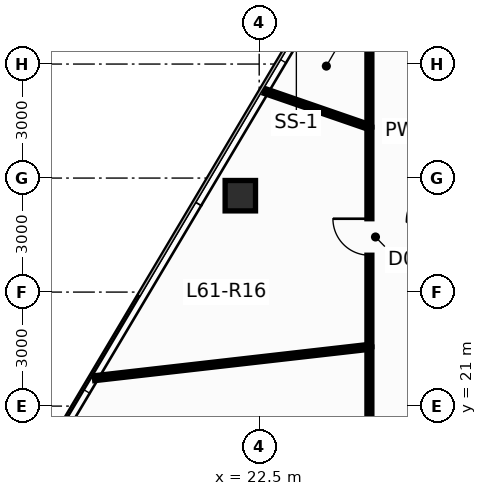
"""IFC4 building model, lengths in metres.
Left out: names, types, materials, properties, quantities, classifications, styles, units other than length and angle.
Written with IfcOpenShell. Run it as: python <this file> out.ifc"""

import sys

from ifc_helpers import new_model, si_unit, direction, frame, frame_2d, origin, origin_2d, place, context, subcontext, project, spatial, rectangle, hollow_rectangle, extrude, source, transform, mapped, element, fill, save


model = new_model("IFC4")
c1 = context("Model", 3, precision=1e-05, world=origin(), true_north=direction((0.0, 1.0)))
c2 = subcontext(c1, "Body", "Model", "MODEL_VIEW")
j1 = project(units=[si_unit("LENGTHUNIT", "METRE"), si_unit("PLANEANGLEUNIT", "RADIAN")], contexts=[c1])
p1 = place(None, origin())
s1 = spatial("IfcSite", under=j1, at=p1, CompositionType="ELEMENT")
p2 = place(p1, origin())
s2 = spatial("IfcBuilding", under=s1, at=p2, CompositionType="ELEMENT")
p3 = place(p2, frame((0.0, 0.0, 233.5)))
s3 = spatial("IfcBuildingStorey", under=s2, at=p3, CompositionType="ELEMENT", Elevation=233.5)
m1 = source(origin(), c2, "Body", "SweptSolid", [
    extrude(hollow_rectangle(XDim=0.8, YDim=0.8, WallThickness=0.045, at=origin_2d()), origin(), (0.0, 0.0, 1.0), 3.651),
])
p4 = place(p3, frame((22.003, 26.536, 0.0), z_axis=(0.014913313399, -0.013776424037, 0.999793880369), x_axis=(0.678553674548, 0.734550822447, 0.0)))
e1 = element("IfcColumn", 1, at=p4, inside=s3, PredefinedType="COLUMN", context=c2, shape_type="MappedRepresentation", body=[
    mapped(m1, transform((0.0, 0.0, 0.0), scale=1.0)),
])
p5 = place(p3, frame((18.164, 21.734, 0.0), z_axis=(0.0, 0.0, 1.0), x_axis=(0.993554604112, 0.113354526363, 0.0)))
e2 = element("IfcWall", 2, at=p5, inside=s3, PredefinedType="PARTITIONING", context=c2, shape_type="SweptSolid", body=[
    extrude(rectangle(XDim=7.278, YDim=0.13, at=frame_2d((3.639, 0.0))), origin(), (0.0, 0.0, 1.0), 3.4),
])
p6 = place(p3, frame((25.4, 22.555, 0.0), z_axis=(0.0, 0.0, 1.0), x_axis=(0.0, -1.0, 0.0)))
e3 = element("IfcWall", 3, at=p6, inside=s3, PredefinedType="PARTITIONING", context=c2, shape_type="SweptSolid", body=[
    extrude(rectangle(XDim=7.35, YDim=0.13, at=frame_2d((3.675, 0.0))), origin(), (0.0, 0.0, 1.0), 3.085),
])
p7 = place(p6, frame((3.195, 0.0, 0.0)))
e4 = element("IfcOpeningElement", 4, at=p7, cuts=e3, PredefinedType="OPENING", context=c2, shape_type="SweptSolid", body=[
    extrude(rectangle(XDim=0.96, YDim=2.15, at=frame_2d((0.48, 1.075))), frame((0.0, 0.077, 0.0), z_axis=(0.0, -1.0, 0.0), x_axis=(1.0, 0.0, 0.0)), (0.0, 0.0, 1.0), 0.154),
])
p8 = place(p3, frame((25.4, 22.565, 0.0), z_axis=(0.0, 0.0, 1.0), x_axis=(0.0, 1.0, 0.0)))
e5 = element("IfcWall", 5, at=p8, inside=s3, PredefinedType="PARTITIONING", context=c2, shape_type="SweptSolid", body=[
    extrude(rectangle(XDim=5.77, YDim=0.13, at=frame_2d((2.885, 0.0))), origin(), (0.0, 0.0, 1.0), 3.085),
])
p9 = place(p8, frame((2.405, 0.0, 0.0)))
e6 = element("IfcOpeningElement", 6, at=p9, cuts=e5, PredefinedType="OPENING", context=c2, shape_type="SweptSolid", body=[
    extrude(rectangle(XDim=0.96, YDim=2.15, at=frame_2d((0.48, 1.075))), frame((0.0, 0.077, 0.0), z_axis=(0.0, -1.0, 0.0), x_axis=(1.0, 0.0, 0.0)), (0.0, 0.0, 1.0), 0.154),
])
p10 = place(p3, frame((25.4, 28.345, 0.0), z_axis=(0.0, 0.0, 1.0), x_axis=(0.0, 1.0, 0.0)))
e7 = element("IfcWall", 7, at=p10, inside=s3, PredefinedType="PARTITIONING", context=c2, shape_type="SweptSolid", body=[
    extrude(rectangle(XDim=3.8, YDim=0.13, at=frame_2d((1.9, 0.0))), origin(), (0.0, 0.0, 1.0), 3.4),
])
p11 = place(p3, frame((22.653, 29.288, 0.0), z_axis=(0.0, 0.0, 1.0), x_axis=(0.94533182382, -0.326110016516, 0.0)))
e8 = element("IfcWall", 8, at=p11, inside=s3, PredefinedType="PARTITIONING", context=c2, shape_type="SweptSolid", body=[
    extrude(rectangle(XDim=2.9, YDim=0.13, at=frame_2d((1.45, 0.0))), origin(), (0.0, 0.0, 1.0), 3.4),
])
p12 = place(p9, origin())
e9 = element("IfcDoor", 9, at=p12, inside=s3, OperationType="SINGLE_SWING_RIGHT", PredefinedType="DOOR", context=c2, shape_type="SweptSolid", body=[
    extrude(rectangle(XDim=0.96, YDim=2.15, at=frame_2d((0.48, 1.075))), frame((0.0, 0.025, 0.0), z_axis=(0.0, -1.0, 0.0), x_axis=(1.0, 0.0, 0.0)), (0.0, 0.0, 1.0), 0.05),
])
fill(e6, e9)
save(model, sys.argv[1])
